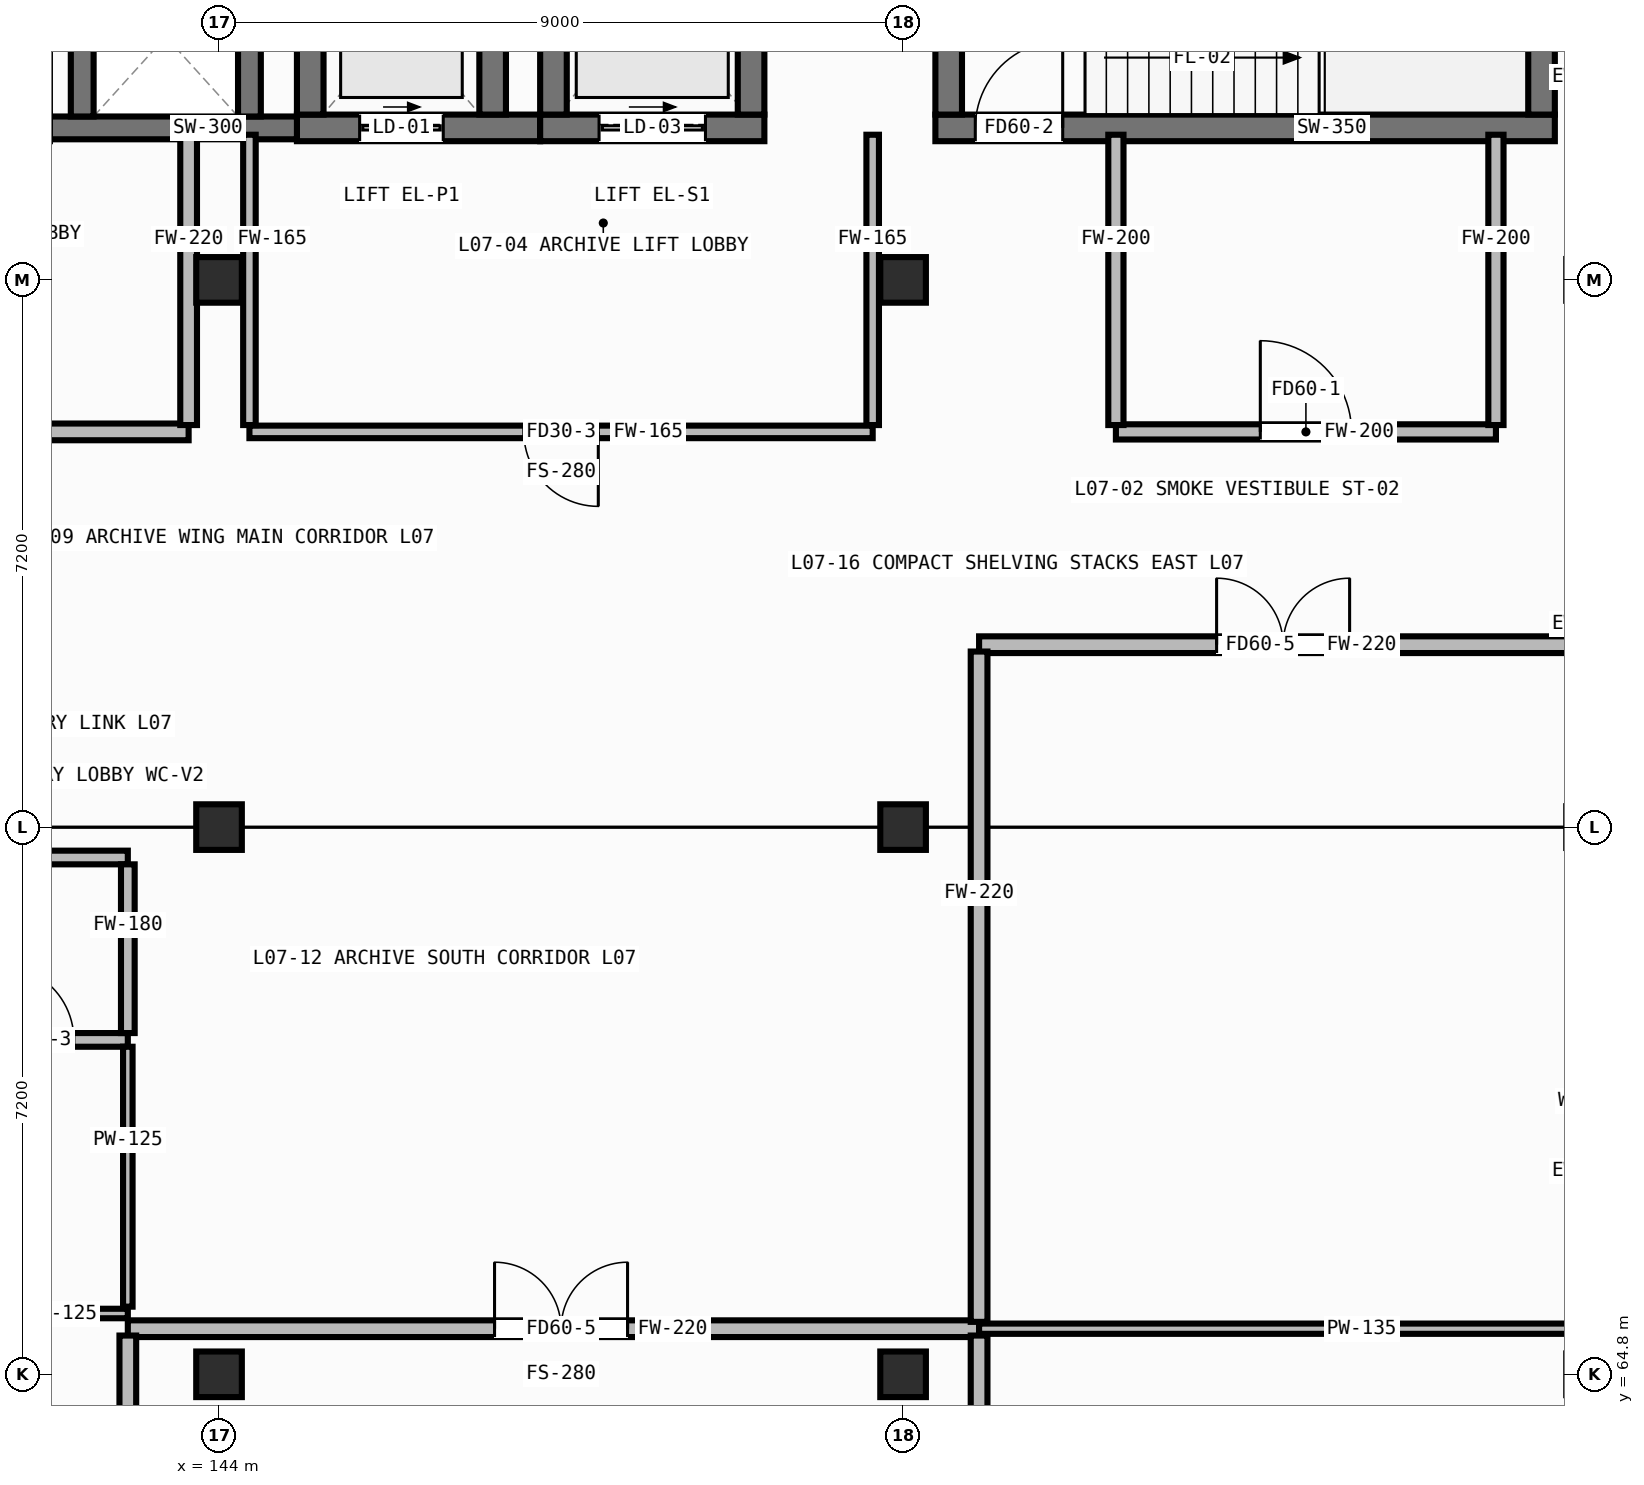
"""IFC4 building model, lengths in metres.
Left out: names, types, materials, properties, quantities, classifications, styles, units other than length and angle.
Written with IfcOpenShell. Run it as: python <this file> out.ifc"""

import sys

from ifc_helpers import new_model, si_unit, direction, frame, frame_2d, origin, origin_2d, place, context, subcontext, project, spatial, rectangle, hollow_rectangle, extrude, element, fill, save


model = new_model("IFC4")
c1 = context("Model", 3, precision=1e-05, world=origin(), true_north=direction((0.0, 1.0)))
c2 = subcontext(c1, "Body", "Model", "MODEL_VIEW")
j1 = project(units=[si_unit("LENGTHUNIT", "METRE"), si_unit("PLANEANGLEUNIT", "RADIAN")], contexts=[c1])
p1 = place(None, origin())
s1 = spatial("IfcSite", under=j1, at=p1, CompositionType="ELEMENT")
p2 = place(p1, origin())
s2 = spatial("IfcBuilding", under=s1, at=p2, CompositionType="ELEMENT")
p3 = place(p2, frame((0.0, 0.0, 24.2)))
s3 = spatial("IfcBuildingStorey", under=s2, at=p3, CompositionType="ELEMENT", Elevation=24.2)
for number, where, z_axis, x_axis in (
    (1, (144.0, 64.8, 0.0), (0.0, 0.0, 1.0), (1.0, 0.0, 0.0)),
    (2, (144.0, 72.0, 0.0), (0.0, 0.0, 1.0), (1.0, 0.0, 0.0)),
    (3, (144.0, 79.2, 0.0), (0.0, 0.0, 1.0), (1.0, 0.0, 0.0)),
    (4, (153.0, 64.8, 0.0), (0.0, 0.0, 1.0), (1.0, 0.0, 0.0)),
    (5, (153.0, 72.0, 0.0), (0.0, 0.0, 1.0), (1.0, 0.0, 0.0)),
    (6, (153.0, 79.2, 0.0), (0.0, 0.0, 1.0), (1.0, 0.0, 0.0)),
):
    element("IfcColumn", number, at=place(p3, frame(where, z_axis=z_axis, x_axis=x_axis)), inside=s3, PredefinedType="COLUMN", context=c2, shape_type="SweptSolid", body=[
        extrude(hollow_rectangle(XDim=0.6, YDim=0.6, WallThickness=0.025, at=origin_2d()), origin(), (0.0, 0.0, 1.0), 3.6),
    ])
p4 = place(p3, frame((153.425, 81.2, 0.0), z_axis=(0.0, 0.0, 1.0), x_axis=(1.0, 0.0, 0.0)))
e7 = element("IfcWall", 7, at=p4, inside=s3, PredefinedType="SHEAR", context=c2, shape_type="SweptSolid", body=[
    extrude(rectangle(XDim=8.15, YDim=0.35, at=frame_2d((4.075, 0.0))), origin(), (0.0, 0.0, 1.0), 3.32),
])
p5 = place(p4, frame((0.525, 0.0, 0.0)))
e8 = element("IfcOpeningElement", 8, at=p5, cuts=e7, PredefinedType="OPENING", context=c2, shape_type="SweptSolid", body=[
    extrude(rectangle(XDim=1.15, YDim=2.1, at=frame_2d((0.575, 1.05))), frame((0.0, 0.187, 0.0), z_axis=(0.0, -1.0, 0.0), x_axis=(1.0, 0.0, 0.0)), (0.0, 0.0, 1.0), 0.374),
])
for number, where, z_axis, x_axis in (
    (9, (153.6, 81.375, 0.0), (0.0, 0.0, 1.0), (0.0, 1.0, 0.0)),
    (10, (161.4, 81.375, 0.0), (0.0, 0.0, 1.0), (0.0, 1.0, 0.0)),
):
    element("IfcWall", number, at=place(p3, frame(where, z_axis=z_axis, x_axis=x_axis)), inside=s3, PredefinedType="SHEAR", context=c2, shape_type="SweptSolid", body=[
        extrude(rectangle(XDim=3.55, YDim=0.35, at=frame_2d((1.775, 0.0))), origin(), (0.0, 0.0, 1.0), 3.32),
    ])
p6 = place(p3, frame((145.025, 81.2, 0.0), z_axis=(0.0, 0.0, 1.0), x_axis=(1.0, 0.0, 0.0)))
e11 = element("IfcWall", 11, at=p6, inside=s3, PredefinedType="SHEAR", context=c2, shape_type="SweptSolid", body=[
    extrude(rectangle(XDim=3.2, YDim=0.35, at=frame_2d((1.6, 0.0))), origin(), (0.0, 0.0, 1.0), 3.32),
])
p7 = place(p6, frame((0.825, 0.0, 0.0)))
e12 = element("IfcOpeningElement", 12, at=p7, cuts=e11, PredefinedType="OPENING", context=c2, shape_type="SweptSolid", body=[
    extrude(rectangle(XDim=1.1, YDim=2.1, at=frame_2d((0.55, 1.05))), frame((0.0, 0.187, 0.0), z_axis=(0.0, -1.0, 0.0), x_axis=(1.0, 0.0, 0.0)), (0.0, 0.0, 1.0), 0.374),
])
for number, where, z_axis, x_axis in (
    (13, (145.2, 81.375, 0.0), (0.0, 0.0, 1.0), (0.0, 1.0, 0.0)),
    (14, (147.6, 81.375, 0.0), (0.0, 0.0, 1.0), (0.0, 1.0, 0.0)),
):
    element("IfcWall", number, at=place(p3, frame(where, z_axis=z_axis, x_axis=x_axis)), inside=s3, PredefinedType="SHEAR", context=c2, shape_type="SweptSolid", body=[
        extrude(rectangle(XDim=2.45, YDim=0.35, at=frame_2d((1.225, 0.0))), origin(), (0.0, 0.0, 1.0), 3.32),
    ])
p8 = place(p3, frame((148.225, 81.2, 0.0), z_axis=(0.0, 0.0, 1.0), x_axis=(1.0, 0.0, 0.0)))
e15 = element("IfcWall", 15, at=p8, inside=s3, PredefinedType="SHEAR", context=c2, shape_type="SweptSolid", body=[
    extrude(rectangle(XDim=2.95, YDim=0.35, at=frame_2d((1.475, 0.0))), origin(), (0.0, 0.0, 1.0), 3.32),
])
p9 = place(p8, frame((0.775, 0.0, 0.0)))
e16 = element("IfcOpeningElement", 16, at=p9, cuts=e15, PredefinedType="OPENING", context=c2, shape_type="SweptSolid", body=[
    extrude(rectangle(XDim=1.4, YDim=2.15, at=frame_2d((0.7, 1.075))), frame((0.0, 0.187, 0.0), z_axis=(0.0, -1.0, 0.0), x_axis=(1.0, 0.0, 0.0)), (0.0, 0.0, 1.0), 0.374),
])
for number, where, z_axis, x_axis in (
    (17, (148.4, 81.375, 0.0), (0.0, 0.0, 1.0), (0.0, 1.0, 0.0)),
    (18, (151.0, 81.375, 0.0), (0.0, 0.0, 1.0), (0.0, 1.0, 0.0)),
):
    element("IfcWall", number, at=place(p3, frame(where, z_axis=z_axis, x_axis=x_axis)), inside=s3, PredefinedType="SHEAR", context=c2, shape_type="SweptSolid", body=[
        extrude(rectangle(XDim=3.05, YDim=0.35, at=frame_2d((1.525, 0.0))), origin(), (0.0, 0.0, 1.0), 3.32),
    ])
p10 = place(p3, frame((141.775, 81.2, 0.0), z_axis=(0.0, 0.0, 1.0), x_axis=(1.0, 0.0, 0.0)))
e19 = element("IfcWall", 19, at=p10, inside=s3, PredefinedType="SHEAR", context=c2, shape_type="SweptSolid", body=[
    extrude(rectangle(XDim=3.25, YDim=0.3, at=frame_2d((1.625, 0.0))), origin(), (0.0, 0.0, 1.0), 3.32),
])
for number, where, z_axis, x_axis in (
    (20, (142.2, 81.35, 0.0), (0.0, 0.0, 1.0), (0.0, 1.0, 0.0)),
    (21, (144.4, 81.35, 0.0), (0.0, 0.0, 1.0), (0.0, 1.0, 0.0)),
):
    element("IfcWall", number, at=place(p3, frame(where, z_axis=z_axis, x_axis=x_axis)), inside=s3, PredefinedType="SHEAR", context=c2, shape_type="SweptSolid", body=[
        extrude(rectangle(XDim=2.1, YDim=0.3, at=frame_2d((1.05, 0.0))), origin(), (0.0, 0.0, 1.0), 3.32),
    ])
p11 = place(p3, frame((155.8, 77.2, 0.0), z_axis=(0.0, 0.0, 1.0), x_axis=(1.0, 0.0, 0.0)))
e22 = element("IfcWall", 22, at=p11, inside=s3, PredefinedType="PARTITIONING", context=c2, shape_type="SweptSolid", body=[
    extrude(rectangle(XDim=5.0, YDim=0.2, at=frame_2d((2.5, 0.0))), origin(), (0.0, 0.0, 1.0), 3.32),
])
p12 = place(p11, frame((1.9, 0.0, 0.0)))
e23 = element("IfcOpeningElement", 23, at=p12, cuts=e22, PredefinedType="OPENING", context=c2, shape_type="SweptSolid", body=[
    extrude(rectangle(XDim=1.2, YDim=2.1, at=frame_2d((0.6, 1.05))), frame((0.0, 0.112, 0.0), z_axis=(0.0, -1.0, 0.0), x_axis=(1.0, 0.0, 0.0)), (0.0, 0.0, 1.0), 0.224),
])
for number, where, z_axis, x_axis in (
    (24, (155.8, 77.29, 0.0), (0.0, 0.0, 1.0), (0.0, 1.0, 0.0)),
    (25, (160.8, 77.29, 0.0), (0.0, 0.0, 1.0), (0.0, 1.0, 0.0)),
):
    element("IfcWall", number, at=place(p3, frame(where, z_axis=z_axis, x_axis=x_axis)), inside=s3, PredefinedType="PARTITIONING", context=c2, shape_type="SweptSolid", body=[
        extrude(rectangle(XDim=3.82, YDim=0.2, at=frame_2d((1.91, 0.0))), origin(), (0.0, 0.0, 1.0), 3.32),
    ])
p13 = place(p3, frame((135.8, 77.2, 0.0), z_axis=(0.0, 0.0, 1.0), x_axis=(1.0, 0.0, 0.0)))
e26 = element("IfcWall", 26, at=p13, inside=s3, PredefinedType="PARTITIONING", context=c2, shape_type="SweptSolid", body=[
    extrude(rectangle(XDim=7.8, YDim=0.22, at=frame_2d((3.9, 0.0))), origin(), (0.0, 0.0, 1.0), 3.32),
])
p14 = place(p13, frame((3.175, 0.0, 0.0)))
e27 = element("IfcOpeningElement", 27, at=p14, cuts=e26, PredefinedType="OPENING", context=c2, shape_type="SweptSolid", body=[
    extrude(rectangle(XDim=1.05, YDim=2.02, at=frame_2d((0.525, 1.01))), frame((0.0, 0.122, 0.0), z_axis=(0.0, -1.0, 0.0), x_axis=(1.0, 0.0, 0.0)), (0.0, 0.0, 1.0), 0.244),
])
p15 = place(p3, frame((143.6, 77.29, 0.0), z_axis=(0.0, 0.0, 1.0), x_axis=(0.0, 1.0, 0.0)))
e28 = element("IfcWall", 28, at=p15, inside=s3, PredefinedType="PARTITIONING", context=c2, shape_type="SweptSolid", body=[
    extrude(rectangle(XDim=3.82, YDim=0.22, at=frame_2d((1.91, 0.0))), origin(), (0.0, 0.0, 1.0), 3.32),
])
p16 = place(p3, frame((144.4, 77.2, 0.0), z_axis=(0.0, 0.0, 1.0), x_axis=(1.0, 0.0, 0.0)))
e29 = element("IfcWall", 29, at=p16, inside=s3, PredefinedType="PARTITIONING", context=c2, shape_type="SweptSolid", body=[
    extrude(rectangle(XDim=8.2, YDim=0.165, at=frame_2d((4.1, 0.0))), origin(), (0.0, 0.0, 1.0), 3.32),
])
p17 = place(p16, frame((3.61, 0.0, 0.0)))
e30 = element("IfcOpeningElement", 30, at=p17, cuts=e29, PredefinedType="OPENING", context=c2, shape_type="SweptSolid", body=[
    extrude(rectangle(XDim=0.98, YDim=2.02, at=frame_2d((0.49, 1.01))), frame((0.0, 0.094, 0.0), z_axis=(0.0, -1.0, 0.0), x_axis=(1.0, 0.0, 0.0)), (0.0, 0.0, 1.0), 0.189),
])
for number, where, z_axis, x_axis in (
    (31, (144.4, 77.29, 0.0), (0.0, 0.0, 1.0), (0.0, 1.0, 0.0)),
    (32, (152.6, 77.29, 0.0), (0.0, 0.0, 1.0), (0.0, 1.0, 0.0)),
):
    element("IfcWall", number, at=place(p3, frame(where, z_axis=z_axis, x_axis=x_axis)), inside=s3, PredefinedType="PARTITIONING", context=c2, shape_type="SweptSolid", body=[
        extrude(rectangle(XDim=3.82, YDim=0.165, at=frame_2d((1.91, 0.0))), origin(), (0.0, 0.0, 1.0), 3.32),
    ])
p18 = place(p3, frame((135.4, 69.2, 0.0), z_axis=(0.0, 0.0, 1.0), x_axis=(1.0, 0.0, 0.0)))
e33 = element("IfcWall", 33, at=p18, inside=s3, PredefinedType="PARTITIONING", context=c2, shape_type="SweptSolid", body=[
    extrude(rectangle(XDim=7.4, YDim=0.18, at=frame_2d((3.7, 0.0))), origin(), (0.0, 0.0, 1.0), 3.32),
])
p19 = place(p18, frame((0.75, 0.0, 0.0)))
e34 = element("IfcOpeningElement", 34, at=p19, cuts=e33, PredefinedType="OPENING", context=c2, shape_type="SweptSolid", body=[
    extrude(rectangle(XDim=1.0, YDim=2.08, at=frame_2d((0.5, 1.04))), frame((0.0, 0.102, 0.0), z_axis=(0.0, -1.0, 0.0), x_axis=(1.0, 0.0, 0.0)), (0.0, 0.0, 1.0), 0.204),
])
p20 = place(p18, frame((3.225, 0.0, 0.0)))
e35 = element("IfcOpeningElement", 35, at=p20, cuts=e33, PredefinedType="OPENING", context=c2, shape_type="SweptSolid", body=[
    extrude(rectangle(XDim=1.05, YDim=2.1, at=frame_2d((0.525, 1.05))), frame((0.0, 0.102, 0.0), z_axis=(0.0, -1.0, 0.0), x_axis=(1.0, 0.0, 0.0)), (0.0, 0.0, 1.0), 0.204),
])
p21 = place(p18, frame((5.71, 0.0, 0.0)))
e36 = element("IfcOpeningElement", 36, at=p21, cuts=e33, PredefinedType="OPENING", context=c2, shape_type="SweptSolid", body=[
    extrude(rectangle(XDim=0.98, YDim=2.02, at=frame_2d((0.49, 1.01))), frame((0.0, 0.102, 0.0), z_axis=(0.0, -1.0, 0.0), x_axis=(1.0, 0.0, 0.0)), (0.0, 0.0, 1.0), 0.204),
])
p22 = place(p3, frame((135.4, 71.6, 0.0), z_axis=(0.0, 0.0, 1.0), x_axis=(1.0, 0.0, 0.0)))
e37 = element("IfcWall", 37, at=p22, inside=s3, PredefinedType="PARTITIONING", context=c2, shape_type="SweptSolid", body=[
    extrude(rectangle(XDim=7.4, YDim=0.18, at=frame_2d((3.7, 0.0))), origin(), (0.0, 0.0, 1.0), 3.32),
])
p23 = place(p22, frame((3.11, 0.0, 0.0)))
e38 = element("IfcOpeningElement", 38, at=p23, cuts=e37, PredefinedType="OPENING", context=c2, shape_type="SweptSolid", body=[
    extrude(rectangle(XDim=0.98, YDim=2.02, at=frame_2d((0.49, 1.01))), frame((0.0, 0.102, 0.0), z_axis=(0.0, -1.0, 0.0), x_axis=(1.0, 0.0, 0.0)), (0.0, 0.0, 1.0), 0.204),
])
p24 = place(p3, frame((142.8, 69.29, 0.0), z_axis=(0.0, 0.0, 1.0), x_axis=(0.0, 1.0, 0.0)))
e39 = element("IfcWall", 39, at=p24, inside=s3, PredefinedType="PARTITIONING", context=c2, shape_type="SweptSolid", body=[
    extrude(rectangle(XDim=2.22, YDim=0.18, at=frame_2d((1.11, 0.0))), origin(), (0.0, 0.0, 1.0), 3.32),
])
p25 = place(p3, frame((140.4, 65.6, 0.0), z_axis=(0.0, 0.0, 1.0), x_axis=(1.0, 0.0, 0.0)))
e40 = element("IfcWall", 40, at=p25, inside=s3, PredefinedType="PARTITIONING", context=c2, shape_type="SweptSolid", body=[
    extrude(rectangle(XDim=2.4, YDim=0.125, at=frame_2d((1.2, 0.0))), origin(), (0.0, 0.0, 1.0), 3.32),
])
p26 = place(p3, frame((142.8, 65.69, 0.0), z_axis=(0.0, 0.0, 1.0), x_axis=(0.0, 1.0, 0.0)))
e41 = element("IfcWall", 41, at=p26, inside=s3, PredefinedType="PARTITIONING", context=c2, shape_type="SweptSolid", body=[
    extrude(rectangle(XDim=3.42, YDim=0.125, at=frame_2d((1.71, 0.0))), origin(), (0.0, 0.0, 1.0), 3.32),
])
p27 = place(p3, frame((142.8, 65.4, 0.0), z_axis=(0.0, 0.0, 1.0), x_axis=(1.0, 0.0, 0.0)))
e42 = element("IfcWall", 42, at=p27, inside=s3, PredefinedType="PARTITIONING", context=c2, shape_type="SweptSolid", body=[
    extrude(rectangle(XDim=11.2, YDim=0.22, at=frame_2d((5.6, 0.0))), origin(), (0.0, 0.0, 1.0), 3.32),
])
p28 = place(p27, frame((4.825, 0.0, 0.0)))
e43 = element("IfcOpeningElement", 43, at=p28, cuts=e42, PredefinedType="OPENING", context=c2, shape_type="SweptSolid", body=[
    extrude(rectangle(XDim=1.75, YDim=2.12, at=frame_2d((0.875, 1.06))), frame((0.0, 0.122, 0.0), z_axis=(0.0, -1.0, 0.0), x_axis=(1.0, 0.0, 0.0)), (0.0, 0.0, 1.0), 0.244),
])
p29 = place(p3, frame((142.8, 57.735, 0.0), z_axis=(0.0, 0.0, 1.0), x_axis=(0.0, 1.0, 0.0)))
e44 = element("IfcWall", 44, at=p29, inside=s3, PredefinedType="PARTITIONING", context=c2, shape_type="SweptSolid", body=[
    extrude(rectangle(XDim=7.575, YDim=0.22, at=frame_2d((3.788, 0.0))), origin(), (0.0, 0.0, 1.0), 3.32),
])
p30 = place(p3, frame((154.0, 57.635, 0.0), z_axis=(0.0, 0.0, 1.0), x_axis=(0.0, 1.0, 0.0)))
e45 = element("IfcWall", 45, at=p30, inside=s3, PredefinedType="PARTITIONING", context=c2, shape_type="SweptSolid", body=[
    extrude(rectangle(XDim=7.675, YDim=0.22, at=frame_2d((3.837, 0.0))), origin(), (0.0, 0.0, 1.0), 3.32),
])
p31 = place(p30, frame((3.265, 0.0, 0.0)))
e46 = element("IfcOpeningElement", 46, at=p31, cuts=e45, PredefinedType="OPENING", context=c2, shape_type="SweptSolid", body=[
    extrude(rectangle(XDim=1.2, YDim=2.1, at=frame_2d((0.6, 1.05))), frame((0.0, 0.122, 0.0), z_axis=(0.0, -1.0, 0.0), x_axis=(1.0, 0.0, 0.0)), (0.0, 0.0, 1.0), 0.244),
])
p32 = place(p3, frame((154.0, 65.4, 0.0), z_axis=(0.0, 0.0, 1.0), x_axis=(1.0, 0.0, 0.0)))
e47 = element("IfcWall", 47, at=p32, inside=s3, PredefinedType="PARTITIONING", context=c2, shape_type="SweptSolid", body=[
    extrude(rectangle(XDim=7.865, YDim=0.135, at=frame_2d((3.933, 0.0))), origin(), (0.0, 0.0, 1.0), 3.32),
])
p33 = place(p3, frame((154.0, 74.4, 0.0), z_axis=(0.0, 0.0, 1.0), x_axis=(1.0, 0.0, 0.0)))
e48 = element("IfcWall", 48, at=p33, inside=s3, PredefinedType="PARTITIONING", context=c2, shape_type="SweptSolid", body=[
    extrude(rectangle(XDim=7.865, YDim=0.22, at=frame_2d((3.933, 0.0))), origin(), (0.0, 0.0, 1.0), 3.32),
])
p34 = place(p33, frame((3.125, 0.0, 0.0)))
e49 = element("IfcOpeningElement", 49, at=p34, cuts=e48, PredefinedType="OPENING", context=c2, shape_type="SweptSolid", body=[
    extrude(rectangle(XDim=1.75, YDim=2.12, at=frame_2d((0.875, 1.06))), frame((0.0, 0.122, 0.0), z_axis=(0.0, -1.0, 0.0), x_axis=(1.0, 0.0, 0.0)), (0.0, 0.0, 1.0), 0.244),
])
p35 = place(p3, frame((154.0, 65.49, 0.0), z_axis=(0.0, 0.0, 1.0), x_axis=(0.0, 1.0, 0.0)))
e50 = element("IfcWall", 50, at=p35, inside=s3, PredefinedType="PARTITIONING", context=c2, shape_type="SweptSolid", body=[
    extrude(rectangle(XDim=8.82, YDim=0.22, at=frame_2d((4.41, 0.0))), origin(), (0.0, 0.0, 1.0), 3.32),
])
p36 = place(p5, origin())
e51 = element("IfcDoor", 51, at=p36, inside=s3, OperationType="SINGLE_SWING_RIGHT", PredefinedType="DOOR", context=c2, shape_type="SweptSolid", body=[
    extrude(rectangle(XDim=1.15, YDim=2.1, at=frame_2d((0.575, 1.05))), frame((0.0, 0.025, 0.0), z_axis=(0.0, -1.0, 0.0), x_axis=(1.0, 0.0, 0.0)), (0.0, 0.0, 1.0), 0.05),
])
fill(e8, e51)
p37 = place(p7, origin())
e52 = element("IfcDoor", 52, at=p37, inside=s3, OperationType="SLIDING_TO_LEFT", PredefinedType="DOOR", context=c2, shape_type="SweptSolid", body=[
    extrude(rectangle(XDim=1.1, YDim=2.1, at=frame_2d((0.55, 1.05))), frame((0.0, 0.025, 0.0), z_axis=(0.0, -1.0, 0.0), x_axis=(1.0, 0.0, 0.0)), (0.0, 0.0, 1.0), 0.05),
])
fill(e12, e52)
p38 = place(p9, origin())
e53 = element("IfcDoor", 53, at=p38, inside=s3, OperationType="SLIDING_TO_LEFT", PredefinedType="DOOR", context=c2, shape_type="SweptSolid", body=[
    extrude(rectangle(XDim=1.4, YDim=2.15, at=frame_2d((0.7, 1.075))), frame((0.0, 0.025, 0.0), z_axis=(0.0, -1.0, 0.0), x_axis=(1.0, 0.0, 0.0)), (0.0, 0.0, 1.0), 0.05),
])
fill(e16, e53)
p39 = place(p12, origin())
e54 = element("IfcDoor", 54, at=p39, inside=s3, OperationType="SINGLE_SWING_LEFT", PredefinedType="DOOR", context=c2, shape_type="SweptSolid", body=[
    extrude(rectangle(XDim=1.2, YDim=2.1, at=frame_2d((0.6, 1.05))), frame((0.0, 0.025, 0.0), z_axis=(0.0, -1.0, 0.0), x_axis=(1.0, 0.0, 0.0)), (0.0, 0.0, 1.0), 0.05),
])
fill(e23, e54)
p40 = place(p17, frame((0.98, 0.0, 0.0), z_axis=(0.0, 0.0, 1.0), x_axis=(-1.0, 0.0, 0.0)))
e55 = element("IfcDoor", 55, at=p40, inside=s3, OperationType="SINGLE_SWING_LEFT", PredefinedType="DOOR", context=c2, shape_type="SweptSolid", body=[
    extrude(rectangle(XDim=0.98, YDim=2.02, at=frame_2d((0.49, 1.01))), frame((0.0, 0.025, 0.0), z_axis=(0.0, -1.0, 0.0), x_axis=(1.0, 0.0, 0.0)), (0.0, 0.0, 1.0), 0.05),
])
fill(e30, e55)
p41 = place(p21, origin())
e56 = element("IfcDoor", 56, at=p41, inside=s3, OperationType="SINGLE_SWING_LEFT", PredefinedType="DOOR", context=c2, shape_type="SweptSolid", body=[
    extrude(rectangle(XDim=0.98, YDim=2.02, at=frame_2d((0.49, 1.01))), frame((0.0, 0.025, 0.0), z_axis=(0.0, -1.0, 0.0), x_axis=(1.0, 0.0, 0.0)), (0.0, 0.0, 1.0), 0.05),
])
fill(e36, e56)
p42 = place(p28, origin())
e57 = element("IfcDoor", 57, at=p42, inside=s3, OperationType="DOUBLE_DOOR_SINGLE_SWING", PredefinedType="DOOR", context=c2, shape_type="SweptSolid", body=[
    extrude(rectangle(XDim=1.75, YDim=2.12, at=frame_2d((0.875, 1.06))), frame((0.0, 0.025, 0.0), z_axis=(0.0, -1.0, 0.0), x_axis=(1.0, 0.0, 0.0)), (0.0, 0.0, 1.0), 0.05),
])
fill(e43, e57)
p43 = place(p34, origin())
e58 = element("IfcDoor", 58, at=p43, inside=s3, OperationType="DOUBLE_DOOR_SINGLE_SWING", PredefinedType="DOOR", context=c2, shape_type="SweptSolid", body=[
    extrude(rectangle(XDim=1.75, YDim=2.12, at=frame_2d((0.875, 1.06))), frame((0.0, 0.025, 0.0), z_axis=(0.0, -1.0, 0.0), x_axis=(1.0, 0.0, 0.0)), (0.0, 0.0, 1.0), 0.05),
])
fill(e49, e58)
save(model, sys.argv[1])
